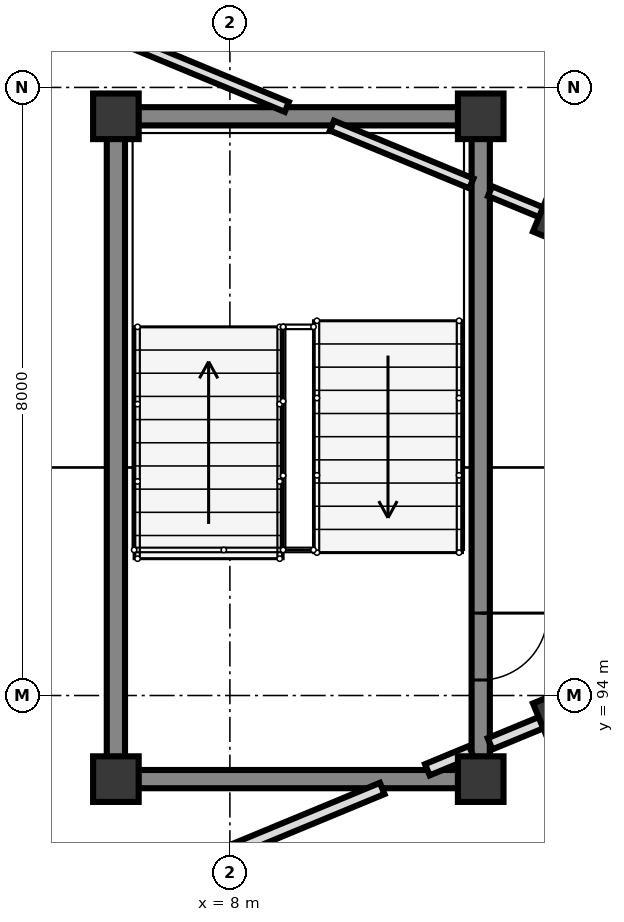
"""IFC4 building model, lengths in metres.
Left out: names, types, materials, properties, quantities, classifications, styles, units other than length and angle.
Written with IfcOpenShell. Run it as: python <this file> out.ifc"""

import sys

from ifc_helpers import new_model, si_unit, direction, frame, frame_2d, origin, origin_2d, place, context, subcontext, project, spatial, rectangle, extrude, element, fill, save


model = new_model("IFC4")
c1 = context("Model", 3, precision=1e-05, world=origin(), true_north=direction((0.0, 1.0)))
c2 = subcontext(c1, "Body", "Model", "MODEL_VIEW")
j1 = project(units=[si_unit("LENGTHUNIT", "METRE"), si_unit("PLANEANGLEUNIT", "RADIAN")], contexts=[c1])
p1 = place(None, origin())
s1 = spatial("IfcSite", under=j1, at=p1, CompositionType="ELEMENT")
p2 = place(p1, origin())
s2 = spatial("IfcBuilding", under=s1, at=p2, CompositionType="ELEMENT")
p3 = place(p2, frame((0.0, 0.0, 8.5)))
s3 = spatial("IfcBuildingStorey", under=s2, at=p3, CompositionType="ELEMENT", Elevation=8.5)
for number, where, z_axis, x_axis in (
    (1, (6.5, 92.9, 0.0), (0.0, 0.0, 1.0), (1.0, 0.0, 0.0)),
    (2, (11.3, 92.9, 0.0), (0.0, 0.0, 1.0), (1.0, 0.0, 0.0)),
    (3, (11.3, 101.62, 0.0), (0.0, 0.0, 1.0), (1.0, 0.0, 0.0)),
    (4, (6.5, 101.62, 0.0), (0.0, 0.0, 1.0), (1.0, 0.0, 0.0)),
):
    element("IfcColumn", number, at=place(p3, frame(where, z_axis=z_axis, x_axis=x_axis)), inside=s3, PredefinedType="COLUMN", context=c2, shape_type="SweptSolid", body=[
        extrude(rectangle(XDim=0.6, YDim=0.6, at=origin_2d()), origin(), (0.0, 0.0, 1.0), 4.0),
    ])
for number, where, z_axis, x_axis in (
    (5, (12.347, 100.253, 0.0), (0.0, 0.0, 1.0), (-0.924, 0.383, 0.0)),
    (6, (12.347, 93.747, 0.0), (0.0, 0.0, 1.0), (-0.924, -0.383, 0.0)),
):
    element("IfcColumn", number, at=place(p3, frame(where, z_axis=z_axis, x_axis=x_axis)), inside=s3, PredefinedType="COLUMN", context=c2, shape_type="SweptSolid", body=[
        extrude(rectangle(XDim=0.55, YDim=0.55, at=origin_2d()), origin(), (0.0, 0.0, 1.0), 4.0),
    ])
p4 = place(p3, frame((6.5, 93.192, 0.0), z_axis=(0.0, 0.0, 1.0), x_axis=(0.0, 1.0, 0.0)))
e7 = element("IfcWall", 7, at=p4, inside=s3, PredefinedType="SHEAR", context=c2, shape_type="SweptSolid", body=[
    extrude(rectangle(XDim=8.136, YDim=0.24, at=frame_2d((4.068, 0.0))), origin(), (0.0, 0.0, 1.0), 3.74),
])
p5 = place(p3, frame((11.3, 101.328, 0.0), z_axis=(0.0, 0.0, 1.0), x_axis=(0.0, -1.0, 0.0)))
e8 = element("IfcWall", 8, at=p5, inside=s3, PredefinedType="SHEAR", context=c2, shape_type="SweptSolid", body=[
    extrude(rectangle(XDim=8.136, YDim=0.24, at=frame_2d((4.068, 0.0))), origin(), (0.0, 0.0, 1.0), 3.74),
])
p6 = place(p5, frame((6.244, 0.0, 0.0)))
e9 = element("IfcOpeningElement", 9, at=p6, cuts=e8, PredefinedType="OPENING", context=c2, shape_type="SweptSolid", body=[
    extrude(rectangle(XDim=0.88, YDim=2.1, at=frame_2d((0.44, 1.05))), frame((0.0, 0.13, 0.0), z_axis=(0.0, -1.0, 0.0), x_axis=(1.0, 0.0, 0.0)), (0.0, 0.0, 1.0), 0.26),
])
for number, where, z_axis, x_axis in (
    (10, (11.008, 92.9, 0.0), (0.0, 0.0, 1.0), (-1.0, 0.0, 0.0)),
    (11, (11.008, 101.62, 0.0), (0.0, 0.0, 1.0), (-1.0, 0.0, 0.0)),
):
    element("IfcWall", number, at=place(p3, frame(where, z_axis=z_axis, x_axis=x_axis)), inside=s3, PredefinedType="SHEAR", context=c2, shape_type="SweptSolid", body=[
        extrude(rectangle(XDim=4.216, YDim=0.24, at=frame_2d((2.108, 0.0))), origin(), (0.0, 0.0, 1.0), 3.74),
    ])
p7 = place(p3, frame((12.1, 100.355, 0.0), z_axis=(0.0, 0.0, 1.0), x_axis=(-0.924069600435, 0.382224245113, 0.0)))
e12 = element("IfcWall", 12, at=p7, inside=s3, PredefinedType="PARTITIONING", context=c2, shape_type="SweptSolid", body=[
    extrude(rectangle(XDim=0.733, YDim=0.14, at=frame_2d((0.366, 0.0))), origin(), (0.0, 0.0, 1.0), 3.7),
])
p8 = place(p3, frame((11.177, 100.737, 0.0), z_axis=(0.0, 0.0, 1.0), x_axis=(-0.923817443679, 0.382833293686, 0.0)))
e13 = element("IfcWall", 13, at=p8, inside=s3, PredefinedType="PARTITIONING", context=c2, shape_type="SweptSolid", body=[
    extrude(rectangle(XDim=1.985, YDim=0.14, at=frame_2d((0.993, 0.0))), origin(), (0.0, 0.0, 1.0), 3.7),
])
p9 = place(p3, frame((8.749, 101.743, 0.0), z_axis=(0.0, 0.0, 1.0), x_axis=(-0.923877739946, 0.382687759972, 0.0)))
e14 = element("IfcWall", 14, at=p9, inside=s3, PredefinedType="PARTITIONING", context=c2, shape_type="SweptSolid", body=[
    extrude(rectangle(XDim=4.813, YDim=0.14, at=frame_2d((2.407, 0.0))), origin(), (0.0, 0.0, 1.0), 3.7),
])
p10 = place(p3, frame((12.1, 93.645, 0.0), z_axis=(0.0, 0.0, 1.0), x_axis=(-0.924069600435, -0.382224245113, 0.0)))
e15 = element("IfcWall", 15, at=p10, inside=s3, PredefinedType="PARTITIONING", context=c2, shape_type="SweptSolid", body=[
    extrude(rectangle(XDim=0.733, YDim=0.16, at=frame_2d((0.366, 0.0))), origin(), (0.0, 0.0, 1.0), 3.072),
])
p11 = place(p3, frame((11.177, 93.263, 0.0), z_axis=(0.0, 0.0, 1.0), x_axis=(-0.923812676193, -0.382844797933, 0.0)))
e16 = element("IfcWall", 16, at=p11, inside=s3, PredefinedType="PARTITIONING", context=c2, shape_type="SweptSolid", body=[
    extrude(rectangle(XDim=0.627, YDim=0.16, at=frame_2d((0.313, 0.0))), origin(), (0.0, 0.0, 1.0), 3.072),
])
p12 = place(p3, frame((10.004, 92.777, 0.0), z_axis=(0.0, 0.0, 1.0), x_axis=(-0.923864955254, -0.382718623082, 0.0)))
e17 = element("IfcWall", 17, at=p12, inside=s3, PredefinedType="PARTITIONING", context=c2, shape_type="SweptSolid", body=[
    extrude(rectangle(XDim=6.172, YDim=0.16, at=frame_2d((3.086, 0.0))), origin(), (0.0, 0.0, 1.0), 3.072),
])
p13 = place(p6, origin())
e18 = element("IfcDoor", 18, at=p13, inside=s3, OperationType="SINGLE_SWING_LEFT", PredefinedType="DOOR", context=c2, shape_type="SweptSolid", body=[
    extrude(rectangle(XDim=0.88, YDim=2.1, at=frame_2d((0.44, 1.05))), frame((0.0, 0.025, 0.0), z_axis=(0.0, -1.0, 0.0), x_axis=(1.0, 0.0, 0.0)), (0.0, 0.0, 1.0), 0.05),
])
fill(e9, e18)
save(model, sys.argv[1])
